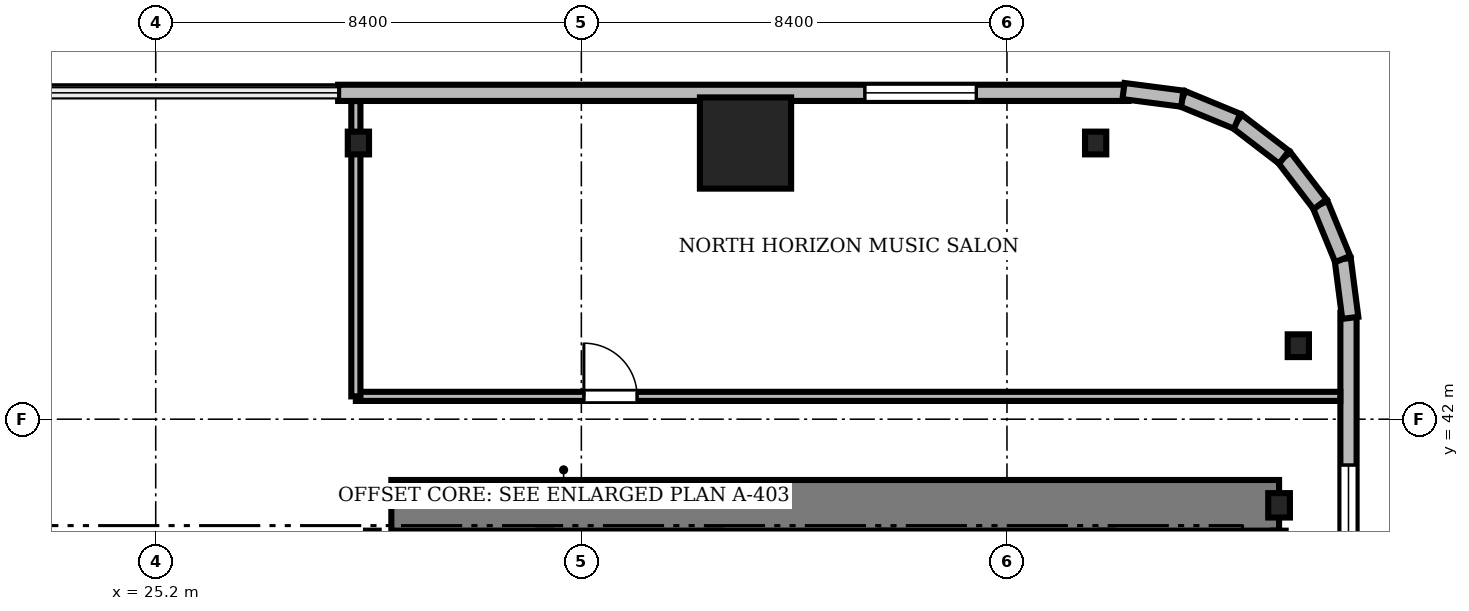
"""IFC4 building model, lengths in metres.
Left out: names, types, materials, properties, quantities, classifications, styles, units other than length and angle.
Written with IfcOpenShell. Run it as: python <this file> out.ifc"""

import sys

from ifc_helpers import new_model, si_unit, direction, frame, frame_2d, origin, origin_2d, place, context, subcontext, project, spatial, rectangle, i_section, extrude, source, transform, mapped, element, fill, save


model = new_model("IFC4")
c1 = context("Model", 3, precision=1e-05, world=origin(), true_north=direction((0.0, 1.0)))
c2 = subcontext(c1, "Body", "Model", "MODEL_VIEW")
j1 = project(units=[si_unit("LENGTHUNIT", "METRE"), si_unit("PLANEANGLEUNIT", "RADIAN")], contexts=[c1])
p1 = place(None, origin())
s1 = spatial("IfcSite", under=j1, at=p1, CompositionType="ELEMENT")
p2 = place(p1, origin())
s2 = spatial("IfcBuilding", under=s1, at=p2, CompositionType="ELEMENT")
p3 = place(p2, frame((0.0, 0.0, 82.35)))
s3 = spatial("IfcBuildingStorey", under=s2, at=p3, CompositionType="ELEMENT", Elevation=82.35)
m1 = source(origin(), c2, "Body", "SweptSolid", [
    extrude(rectangle(XDim=17.52, YDim=1.0, at=frame_2d((8.76, 0.0))), origin(), (0.0, 0.0, 1.0), 3.41),
])
p4 = place(p3, frame((29.85, 40.3, 0.0), z_axis=(0.0, 0.0, 1.0), x_axis=(1.0, 0.0, 0.0)))
e1 = element("IfcWall", 1, at=p4, inside=s3, PredefinedType="SHEAR", context=c2, shape_type="MappedRepresentation", body=[
    mapped(m1, transform((0.0, 0.0, 0.0), scale=1.0)),
])
m2 = source(origin(), c2, "Body", "SweptSolid", [
    extrude(i_section(OverallWidth=0.428, OverallDepth=0.481, WebThickness=0.04, FlangeThickness=0.063, FilletRadius=0.015, at=origin_2d()), origin(), (0.0, 0.0, 1.0), 3.41),
])
p5 = place(p3, frame((47.37, 40.3, 0.0), z_axis=(0.0, 0.0, 1.0), x_axis=(1.0, 0.0, 0.0)))
e2 = element("IfcColumn", 2, at=p5, inside=s3, PredefinedType="COLUMN", context=c2, shape_type="MappedRepresentation", body=[
    mapped(m2, transform((0.0, 0.0, 0.0), scale=1.0)),
])
m3 = source(origin(), c2, "Body", "SweptSolid", [
    extrude(rectangle(XDim=1.8, YDim=1.8, at=origin_2d()), origin(), (0.0, 0.0, 1.0), 3.41),
])
p6 = place(p3, frame((36.84, 47.45, 0.0), z_axis=(0.0, 0.0, 1.0), x_axis=(1.0, 0.0, 0.0)))
e3 = element("IfcColumn", 3, at=p6, inside=s3, PredefinedType="COLUMN", context=c2, shape_type="MappedRepresentation", body=[
    mapped(m3, transform((0.0, 0.0, 0.0), scale=1.0)),
])
m4 = source(origin(), c2, "Body", "SweptSolid", [
    extrude(i_section(OverallWidth=0.419, OverallDepth=0.449, WebThickness=0.031, FlangeThickness=0.048, FilletRadius=0.015, at=origin_2d()), origin(), (0.0, 0.0, 1.0), 3.41),
])
for number, where, z_axis, x_axis in (
    (4, (47.75, 43.45, 0.0), (0.0, 0.0, 1.0), (1.0, 0.0, 0.0)),
    (5, (43.75, 47.45, 0.0), (0.0, 0.0, 1.0), (1.0, 0.0, 0.0)),
    (6, (29.2, 47.45, 0.0), (0.0, 0.0, 1.0), (1.0, 0.0, 0.0)),
):
    element("IfcColumn", number, at=place(p3, frame(where, z_axis=z_axis, x_axis=x_axis)), inside=s3, PredefinedType="COLUMN", context=c2, shape_type="MappedRepresentation", body=[
        mapped(m4, transform((0.0, 0.0, 0.0), scale=1.0)),
    ])
m5 = source(origin(), c2, "Body", "SweptSolid", [
    extrude(rectangle(XDim=15.6, YDim=0.32, at=frame_2d((7.8, 0.0))), origin(), (0.0, 0.0, 1.0), 3.41),
])
p7 = place(p3, frame((44.4, 48.44, 0.0), z_axis=(0.0, 0.0, 1.0), x_axis=(-1.0, 0.0, 0.0)))
e7 = element("IfcWall", 7, at=p7, inside=s3, PredefinedType="SOLIDWALL", context=c2, shape_type="MappedRepresentation", body=[
    mapped(m5, transform((0.0, 0.0, 0.0), scale=1.0)),
])
m6 = source(origin(), c2, "Body", "SweptSolid", [
    extrude(rectangle(XDim=2.2, YDim=2.4, at=frame_2d((1.1, 1.2))), frame((0.0, 0.17, 0.0), z_axis=(0.0, -1.0, 0.0), x_axis=(1.0, 0.0, 0.0)), (0.0, 0.0, 1.0), 0.34),
])
p8 = place(p7, frame((3.005, 0.0, 0.72)))
e8 = element("IfcOpeningElement", 8, at=p8, cuts=e7, PredefinedType="OPENING", context=c2, shape_type="MappedRepresentation", body=[
    mapped(m6, transform((0.0, 0.0, 0.0), scale=1.0)),
])
m7 = source(origin(), c2, "Body", "SweptSolid", [
    extrude(rectangle(XDim=15.6, YDim=0.32, at=frame_2d((7.8, 0.0))), origin(), (0.0, 0.0, 1.0), 3.41),
])
p9 = place(p3, frame((48.74, 28.5, 0.0), z_axis=(0.0, 0.0, 1.0), x_axis=(0.0, 1.0, 0.0)))
e9 = element("IfcWall", 9, at=p9, inside=s3, PredefinedType="SOLIDWALL", context=c2, shape_type="MappedRepresentation", body=[
    mapped(m7, transform((0.0, 0.0, 0.0), scale=1.0)),
])
p10 = place(p9, frame((10.395, 0.0, 0.72)))
e10 = element("IfcOpeningElement", 10, at=p10, cuts=e9, PredefinedType="OPENING", context=c2, shape_type="MappedRepresentation", body=[
    mapped(m6, transform((0.0, 0.0, 0.0), scale=1.0)),
])
m8 = source(origin(), c2, "Body", "SweptSolid", [
    extrude(rectangle(XDim=1.17, YDim=0.32, at=frame_2d((0.585, 0.0))), origin(), (0.0, 0.0, 1.0), 3.41),
])
p11 = place(p3, frame((48.776, 44.0, 0.0), z_axis=(0.0, 0.0, 1.0), x_axis=(-0.128295670475, 0.991735963317, 0.0)))
e11 = element("IfcWall", 11, at=p11, inside=s3, PredefinedType="SOLIDWALL", context=c2, shape_type="MappedRepresentation", body=[
    mapped(m8, transform((0.0, 0.0, 0.0), scale=1.0)),
])
m9 = source(origin(), c2, "Body", "SweptSolid", [
    extrude(rectangle(XDim=1.169, YDim=0.32, at=frame_2d((0.584, 0.0))), origin(), (0.0, 0.0, 1.0), 3.41),
])
p12 = place(p3, frame((48.625, 45.16, 0.0), z_axis=(0.0, 0.0, 1.0), x_axis=(-0.381054331552, 0.924552646638, 0.0)))
e12 = element("IfcWall", 12, at=p12, inside=s3, PredefinedType="SOLIDWALL", context=c2, shape_type="MappedRepresentation", body=[
    mapped(m9, transform((0.0, 0.0, 0.0), scale=1.0)),
])
m10 = source(origin(), c2, "Body", "SweptSolid", [
    extrude(rectangle(XDim=1.169, YDim=0.32, at=frame_2d((0.584, 0.0))), origin(), (0.0, 0.0, 1.0), 3.41),
])
p13 = place(p3, frame((48.18, 46.241, 0.0), z_axis=(0.0, 0.0, 1.0), x_axis=(-0.608387696831, 0.793639975269, 0.0)))
e13 = element("IfcWall", 13, at=p13, inside=s3, PredefinedType="SOLIDWALL", context=c2, shape_type="MappedRepresentation", body=[
    mapped(m10, transform((0.0, 0.0, 0.0), scale=1.0)),
])
m11 = source(origin(), c2, "Body", "SweptSolid", [
    extrude(rectangle(XDim=1.169, YDim=0.32, at=frame_2d((0.584, 0.0))), origin(), (0.0, 0.0, 1.0), 3.41),
])
p14 = place(p3, frame((47.469, 47.169, 0.0), z_axis=(0.0, 0.0, 1.0), x_axis=(-0.793663520347, 0.608356981114, 0.0)))
e14 = element("IfcWall", 14, at=p14, inside=s3, PredefinedType="SOLIDWALL", context=c2, shape_type="MappedRepresentation", body=[
    mapped(m11, transform((0.0, 0.0, 0.0), scale=1.0)),
])
p15 = place(p3, frame((46.541, 47.88, 0.0), z_axis=(0.0, 0.0, 1.0), x_axis=(-0.924552646638, 0.381054331552, 0.0)))
e15 = element("IfcWall", 15, at=p15, inside=s3, PredefinedType="SOLIDWALL", context=c2, shape_type="MappedRepresentation", body=[
    mapped(m9, transform((0.0, 0.0, 0.0), scale=1.0)),
])
p16 = place(p3, frame((45.46, 48.325, 0.0), z_axis=(0.0, 0.0, 1.0), x_axis=(-0.991735963317, 0.128295670475, 0.0)))
e16 = element("IfcWall", 16, at=p16, inside=s3, PredefinedType="SOLIDWALL", context=c2, shape_type="MappedRepresentation", body=[
    mapped(m8, transform((0.0, 0.0, 0.0), scale=1.0)),
])
m12 = source(origin(), c2, "Body", "SweptSolid", [
    extrude(rectangle(XDim=9.15, YDim=0.25, at=frame_2d((4.575, 0.0))), origin(), (0.0, 0.0, 1.0), 3.45),
])
for number, where, z_axis, x_axis in (
    (17, (29.475, 30.65, 0.0), (0.0, 0.0, 1.0), (0.0, 1.0, 0.0)),
    (18, (32.875, 30.65, 0.0), (0.0, 0.0, 1.0), (0.0, 1.0, 0.0)),
    (19, (36.225, 30.65, 0.0), (0.0, 0.0, 1.0), (0.0, 1.0, 0.0)),
    (20, (39.625, 30.65, 0.0), (0.0, 0.0, 1.0), (0.0, 1.0, 0.0)),
    (21, (43.975, 30.65, 0.0), (0.0, 0.0, 1.0), (0.0, 1.0, 0.0)),
    (22, (47.375, 30.65, 0.0), (0.0, 0.0, 1.0), (0.0, 1.0, 0.0)),
):
    element("IfcWall", number, at=place(p3, frame(where, z_axis=z_axis, x_axis=x_axis)), inside=s3, PredefinedType="SOLIDWALL", context=c2, shape_type="MappedRepresentation", body=[
        mapped(m12, transform((0.0, 0.0, 0.0), scale=1.0)),
    ])
m13 = source(origin(), c2, "Body", "SweptSolid", [
    extrude(rectangle(XDim=19.428, YDim=0.18, at=frame_2d((9.714, 0.0))), origin(), (0.0, 0.0, 1.0), 2.652),
])
p17 = place(p3, frame((29.15, 42.45, 0.0), z_axis=(0.0, 0.0, 1.0), x_axis=(1.0, 0.0, 0.0)))
e23 = element("IfcWall", 23, at=p17, inside=s3, PredefinedType="PARTITIONING", context=c2, shape_type="MappedRepresentation", body=[
    mapped(m13, transform((0.0, 0.0, 0.0), scale=1.0)),
])
m14 = source(origin(), c2, "Body", "SweptSolid", [
    extrude(rectangle(XDim=1.05, YDim=2.2, at=frame_2d((0.525, 1.1))), frame((0.0, 0.1, 0.0), z_axis=(0.0, -1.0, 0.0), x_axis=(1.0, 0.0, 0.0)), (0.0, 0.0, 1.0), 0.2),
])
p18 = place(p17, frame((4.5, 0.0, 0.0)))
e24 = element("IfcOpeningElement", 24, at=p18, cuts=e23, PredefinedType="OPENING", context=c2, shape_type="MappedRepresentation", body=[
    mapped(m14, transform((0.0, 0.0, 0.0), scale=1.0)),
])
m15 = source(origin(), c2, "Body", "SweptSolid", [
    extrude(rectangle(XDim=5.828, YDim=0.18, at=frame_2d((2.914, 0.0))), origin(), (0.0, 0.0, 1.0), 2.652),
])
p19 = place(p3, frame((29.15, 42.45, 0.0), z_axis=(0.0, 0.0, 1.0), x_axis=(0.0, 1.0, 0.0)))
e25 = element("IfcWall", 25, at=p19, inside=s3, PredefinedType="PARTITIONING", context=c2, shape_type="MappedRepresentation", body=[
    mapped(m15, transform((0.0, 0.0, 0.0), scale=1.0)),
])
m16 = source(origin(), c2, "Body", "SweptSolid", [
    extrude(rectangle(XDim=2.2, YDim=2.4, at=frame_2d((1.1, 1.2))), frame((0.0, 0.03, 0.0), z_axis=(0.0, -1.0, 0.0), x_axis=(1.0, 0.0, 0.0)), (0.0, 0.0, 1.0), 0.06),
])
p20 = place(p8, origin())
e26 = element("IfcWindow", 26, at=p20, inside=s3, PartitioningType="SINGLE_PANEL", PredefinedType="WINDOW", context=c2, shape_type="MappedRepresentation", body=[
    mapped(m16, transform((0.0, 0.0, 0.0), scale=1.0)),
])
fill(e8, e26)
p21 = place(p10, origin())
e27 = element("IfcWindow", 27, at=p21, inside=s3, PartitioningType="SINGLE_PANEL", PredefinedType="WINDOW", context=c2, shape_type="MappedRepresentation", body=[
    mapped(m16, transform((0.0, 0.0, 0.0), scale=1.0)),
])
fill(e10, e27)
m17 = source(origin(), c2, "Body", "SweptSolid", [
    extrude(rectangle(XDim=1.05, YDim=2.2, at=frame_2d((0.525, 1.1))), frame((0.0, 0.025, 0.0), z_axis=(0.0, -1.0, 0.0), x_axis=(1.0, 0.0, 0.0)), (0.0, 0.0, 1.0), 0.05),
])
p22 = place(p18, origin())
e28 = element("IfcDoor", 28, at=p22, inside=s3, OperationType="SINGLE_SWING_LEFT", PredefinedType="DOOR", context=c2, shape_type="MappedRepresentation", body=[
    mapped(m17, transform((0.0, 0.0, 0.0), scale=1.0)),
])
fill(e24, e28)
save(model, sys.argv[1])
